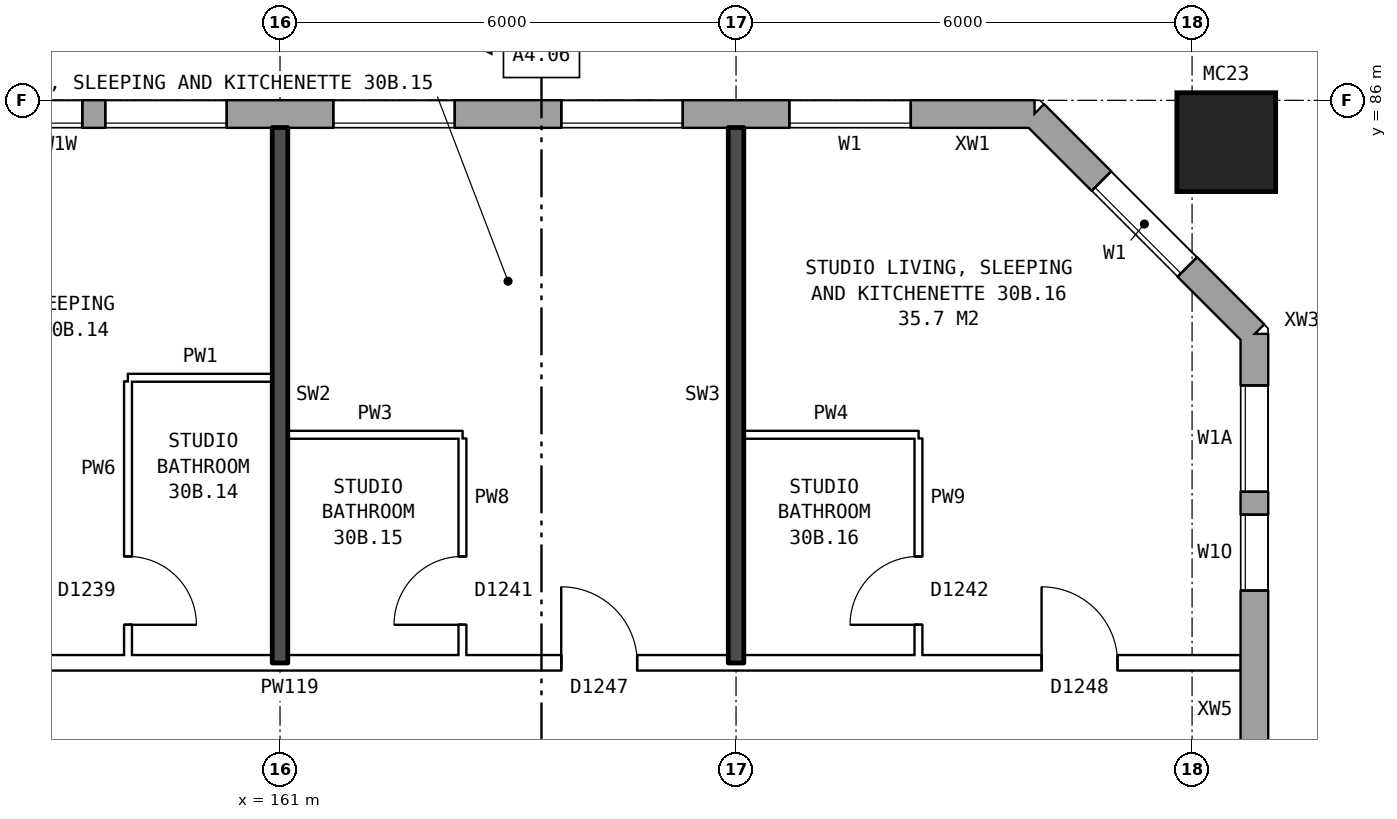
"""IFC4 building model, lengths in metres.
Left out: names, types, materials, properties, quantities, classifications, styles, units other than length and angle.
Written with IfcOpenShell. Run it as: python <this file> out.ifc"""

import sys

from ifc_helpers import new_model, si_unit, direction, frame, frame_2d, origin, origin_2d, place, context, subcontext, project, spatial, rectangle, hollow_rectangle, extrude, element, fill, save


model = new_model("IFC4")
c1 = context("Model", 3, precision=1e-05, world=origin(), true_north=direction((0.0, 1.0)))
c2 = subcontext(c1, "Body", "Model", "MODEL_VIEW")
j1 = project(units=[si_unit("LENGTHUNIT", "METRE"), si_unit("PLANEANGLEUNIT", "RADIAN")], contexts=[c1])
p1 = place(None, origin())
s1 = spatial("IfcSite", under=j1, at=p1, CompositionType="ELEMENT")
p2 = place(p1, origin())
s2 = spatial("IfcBuilding", under=s1, at=p2, CompositionType="ELEMENT")
p3 = place(p2, frame((0.0, 0.0, 108.8)))
s3 = spatial("IfcBuildingStorey", under=s2, at=p3, CompositionType="ELEMENT", Elevation=108.8)
p4 = place(p3, frame((173.45, 85.45, 0.0), z_axis=(0.0, 0.0, 1.0), x_axis=(1.0, 0.0, 0.0)))
e1 = element("IfcColumn", 1, at=p4, inside=s3, PredefinedType="COLUMN", context=c2, shape_type="SweptSolid", body=[
    extrude(hollow_rectangle(XDim=1.3, YDim=1.3, WallThickness=0.07, at=origin_2d()), origin(), (0.0, 0.0, 1.0), 3.1),
])
p5 = place(p3, frame((173.82, 57.075, 0.0), z_axis=(0.0, 0.0, 1.0), x_axis=(0.0, 1.0, 0.0)))
e2 = element("IfcWall", 2, at=p5, inside=s3, PredefinedType="STANDARD", context=c2, shape_type="SweptSolid", body=[
    extrude(rectangle(XDim=25.851, YDim=0.36, at=frame_2d((12.925, 0.0))), origin(), (0.0, 0.0, 1.0), 2.85),
])
p6 = place(p5, frame((0.725, 0.0, 0.8)))
e3 = element("IfcOpeningElement", 3, at=p6, cuts=e2, PredefinedType="OPENING", context=c2, shape_type="SweptSolid", body=[
    extrude(rectangle(XDim=1.6, YDim=1.8, at=frame_2d((0.8, 0.9))), frame((0.0, 0.19, 0.0), z_axis=(0.0, -1.0, 0.0), x_axis=(1.0, 0.0, 0.0)), (0.0, 0.0, 1.0), 0.38),
])
p7 = place(p5, frame((5.525, 0.0, 1.4)))
e4 = element("IfcOpeningElement", 4, at=p7, cuts=e2, PredefinedType="OPENING", context=c2, shape_type="SweptSolid", body=[
    extrude(rectangle(XDim=1.4, YDim=1.2, at=frame_2d((0.7, 0.6))), frame((0.0, 0.19, 0.0), z_axis=(0.0, -1.0, 0.0), x_axis=(1.0, 0.0, 0.0)), (0.0, 0.0, 1.0), 0.38),
])
p8 = place(p5, frame((7.625, 0.0, 0.8)))
e5 = element("IfcOpeningElement", 5, at=p8, cuts=e2, PredefinedType="OPENING", context=c2, shape_type="SweptSolid", body=[
    extrude(rectangle(XDim=1.6, YDim=1.8, at=frame_2d((0.8, 0.9))), frame((0.0, 0.19, 0.0), z_axis=(0.0, -1.0, 0.0), x_axis=(1.0, 0.0, 0.0)), (0.0, 0.0, 1.0), 0.38),
])
p9 = place(p5, frame((10.625, 0.0, 0.8)))
e6 = element("IfcOpeningElement", 6, at=p9, cuts=e2, PredefinedType="OPENING", context=c2, shape_type="SweptSolid", body=[
    extrude(rectangle(XDim=1.6, YDim=1.8, at=frame_2d((0.8, 0.9))), frame((0.0, 0.19, 0.0), z_axis=(0.0, -1.0, 0.0), x_axis=(1.0, 0.0, 0.0)), (0.0, 0.0, 1.0), 0.38),
])
p10 = place(p5, frame((13.625, 0.0, 0.8)))
e7 = element("IfcOpeningElement", 7, at=p10, cuts=e2, PredefinedType="OPENING", context=c2, shape_type="SweptSolid", body=[
    extrude(rectangle(XDim=1.6, YDim=1.8, at=frame_2d((0.8, 0.9))), frame((0.0, 0.19, 0.0), z_axis=(0.0, -1.0, 0.0), x_axis=(1.0, 0.0, 0.0)), (0.0, 0.0, 1.0), 0.38),
])
p11 = place(p5, frame((16.625, 0.0, 0.8)))
e8 = element("IfcOpeningElement", 8, at=p11, cuts=e2, PredefinedType="OPENING", context=c2, shape_type="SweptSolid", body=[
    extrude(rectangle(XDim=1.6, YDim=1.8, at=frame_2d((0.8, 0.9))), frame((0.0, 0.19, 0.0), z_axis=(0.0, -1.0, 0.0), x_axis=(1.0, 0.0, 0.0)), (0.0, 0.0, 1.0), 0.38),
])
p12 = place(p5, frame((9.525, 0.0, 0.8)))
e9 = element("IfcOpeningElement", 9, at=p12, cuts=e2, PredefinedType="OPENING", context=c2, shape_type="SweptSolid", body=[
    extrude(rectangle(XDim=0.8, YDim=1.8, at=frame_2d((0.4, 0.9))), frame((0.0, 0.19, 0.0), z_axis=(0.0, -1.0, 0.0), x_axis=(1.0, 0.0, 0.0)), (0.0, 0.0, 1.0), 0.38),
])
p13 = place(p5, frame((22.475, 0.0, 0.8)))
e10 = element("IfcOpeningElement", 10, at=p13, cuts=e2, PredefinedType="OPENING", context=c2, shape_type="SweptSolid", body=[
    extrude(rectangle(XDim=1.0, YDim=1.2, at=frame_2d((0.5, 0.6))), frame((0.0, 0.19, 0.0), z_axis=(0.0, -1.0, 0.0), x_axis=(1.0, 0.0, 0.0)), (0.0, 0.0, 1.0), 0.38),
])
p14 = place(p5, frame((2.625, 0.0, 0.8)))
e11 = element("IfcOpeningElement", 11, at=p14, cuts=e2, PredefinedType="OPENING", context=c2, shape_type="SweptSolid", body=[
    extrude(rectangle(XDim=0.6, YDim=1.2, at=frame_2d((0.3, 0.6))), frame((0.0, 0.19, 0.0), z_axis=(0.0, -1.0, 0.0), x_axis=(1.0, 0.0, 0.0)), (0.0, 0.0, 1.0), 0.38),
])
p15 = place(p5, frame((12.525, 0.0, 0.8)))
e12 = element("IfcOpeningElement", 12, at=p15, cuts=e2, PredefinedType="OPENING", context=c2, shape_type="SweptSolid", body=[
    extrude(rectangle(XDim=0.8, YDim=1.8, at=frame_2d((0.4, 0.9))), frame((0.0, 0.19, 0.0), z_axis=(0.0, -1.0, 0.0), x_axis=(1.0, 0.0, 0.0)), (0.0, 0.0, 1.0), 0.38),
])
p16 = place(p5, frame((15.525, 0.0, 0.8)))
e13 = element("IfcOpeningElement", 13, at=p16, cuts=e2, PredefinedType="OPENING", context=c2, shape_type="SweptSolid", body=[
    extrude(rectangle(XDim=0.8, YDim=1.8, at=frame_2d((0.4, 0.9))), frame((0.0, 0.19, 0.0), z_axis=(0.0, -1.0, 0.0), x_axis=(1.0, 0.0, 0.0)), (0.0, 0.0, 1.0), 0.38),
])
p17 = place(p5, frame((18.525, 0.0, 0.8)))
e14 = element("IfcOpeningElement", 14, at=p17, cuts=e2, PredefinedType="OPENING", context=c2, shape_type="SweptSolid", body=[
    extrude(rectangle(XDim=0.8, YDim=1.8, at=frame_2d((0.4, 0.9))), frame((0.0, 0.19, 0.0), z_axis=(0.0, -1.0, 0.0), x_axis=(1.0, 0.0, 0.0)), (0.0, 0.0, 1.0), 0.38),
])
p18 = place(p5, frame((23.775, 0.0, 0.8)))
e15 = element("IfcOpeningElement", 15, at=p18, cuts=e2, PredefinedType="OPENING", context=c2, shape_type="SweptSolid", body=[
    extrude(rectangle(XDim=1.4, YDim=1.8, at=frame_2d((0.7, 0.9))), frame((0.0, 0.19, 0.0), z_axis=(0.0, -1.0, 0.0), x_axis=(1.0, 0.0, 0.0)), (0.0, 0.0, 1.0), 0.38),
])
p19 = place(p3, frame((173.82, 82.925, 0.0), z_axis=(0.0, 0.0, 1.0), x_axis=(-0.707106781187, 0.707106781187, 0.0)))
e16 = element("IfcWall", 16, at=p19, inside=s3, PredefinedType="STANDARD", context=c2, shape_type="SweptSolid", body=[
    extrude(rectangle(XDim=4.094, YDim=0.36, at=frame_2d((2.047, 0.0))), origin(), (0.0, 0.0, 1.0), 2.85),
])
p20 = place(p19, frame((1.247, 0.0, 0.8)))
e17 = element("IfcOpeningElement", 17, at=p20, cuts=e16, PredefinedType="OPENING", context=c2, shape_type="SweptSolid", body=[
    extrude(rectangle(XDim=1.6, YDim=1.8, at=frame_2d((0.8, 0.9))), frame((0.0, 0.19, 0.0), z_axis=(0.0, -1.0, 0.0), x_axis=(1.0, 0.0, 0.0)), (0.0, 0.0, 1.0), 0.38),
])
p21 = place(p3, frame((170.925, 85.82, 0.0), z_axis=(0.0, 0.0, 1.0), x_axis=(-1.0, 0.0, 0.0)))
e18 = element("IfcWall", 18, at=p21, inside=s3, PredefinedType="STANDARD", context=c2, shape_type="SweptSolid", body=[
    extrude(rectangle(XDim=36.851, YDim=0.36, at=frame_2d((18.425, 0.0))), origin(), (0.0, 0.0, 1.0), 2.85),
])
p22 = place(p21, frame((1.625, 0.0, 0.8)))
e19 = element("IfcOpeningElement", 19, at=p22, cuts=e18, PredefinedType="OPENING", context=c2, shape_type="SweptSolid", body=[
    extrude(rectangle(XDim=1.6, YDim=1.8, at=frame_2d((0.8, 0.9))), frame((0.0, 0.19, 0.0), z_axis=(0.0, -1.0, 0.0), x_axis=(1.0, 0.0, 0.0)), (0.0, 0.0, 1.0), 0.38),
])
p23 = place(p21, frame((4.625, 0.0, 0.8)))
e20 = element("IfcOpeningElement", 20, at=p23, cuts=e18, PredefinedType="OPENING", context=c2, shape_type="SweptSolid", body=[
    extrude(rectangle(XDim=1.6, YDim=1.8, at=frame_2d((0.8, 0.9))), frame((0.0, 0.19, 0.0), z_axis=(0.0, -1.0, 0.0), x_axis=(1.0, 0.0, 0.0)), (0.0, 0.0, 1.0), 0.38),
])
p24 = place(p21, frame((7.625, 0.0, 0.8)))
e21 = element("IfcOpeningElement", 21, at=p24, cuts=e18, PredefinedType="OPENING", context=c2, shape_type="SweptSolid", body=[
    extrude(rectangle(XDim=1.6, YDim=1.8, at=frame_2d((0.8, 0.9))), frame((0.0, 0.19, 0.0), z_axis=(0.0, -1.0, 0.0), x_axis=(1.0, 0.0, 0.0)), (0.0, 0.0, 1.0), 0.38),
])
p25 = place(p21, frame((10.625, 0.0, 0.8)))
e22 = element("IfcOpeningElement", 22, at=p25, cuts=e18, PredefinedType="OPENING", context=c2, shape_type="SweptSolid", body=[
    extrude(rectangle(XDim=1.6, YDim=1.8, at=frame_2d((0.8, 0.9))), frame((0.0, 0.19, 0.0), z_axis=(0.0, -1.0, 0.0), x_axis=(1.0, 0.0, 0.0)), (0.0, 0.0, 1.0), 0.38),
])
p26 = place(p21, frame((12.525, 0.0, 1.7)))
e23 = element("IfcOpeningElement", 23, at=p26, cuts=e18, PredefinedType="OPENING", context=c2, shape_type="SweptSolid", body=[
    extrude(rectangle(XDim=0.6, YDim=0.9, at=frame_2d((0.3, 0.45))), frame((0.0, 0.19, 0.0), z_axis=(0.0, -1.0, 0.0), x_axis=(1.0, 0.0, 0.0)), (0.0, 0.0, 1.0), 0.38),
])
p27 = place(p21, frame((16.625, 0.0, 0.8)))
e24 = element("IfcOpeningElement", 24, at=p27, cuts=e18, PredefinedType="OPENING", context=c2, shape_type="SweptSolid", body=[
    extrude(rectangle(XDim=1.6, YDim=1.8, at=frame_2d((0.8, 0.9))), frame((0.0, 0.19, 0.0), z_axis=(0.0, -1.0, 0.0), x_axis=(1.0, 0.0, 0.0)), (0.0, 0.0, 1.0), 0.38),
])
p28 = place(p21, frame((19.625, 0.0, 0.8)))
e25 = element("IfcOpeningElement", 25, at=p28, cuts=e18, PredefinedType="OPENING", context=c2, shape_type="SweptSolid", body=[
    extrude(rectangle(XDim=1.6, YDim=1.8, at=frame_2d((0.8, 0.9))), frame((0.0, 0.19, 0.0), z_axis=(0.0, -1.0, 0.0), x_axis=(1.0, 0.0, 0.0)), (0.0, 0.0, 1.0), 0.38),
])
p29 = place(p21, frame((22.125, 0.0, 0.15)))
e26 = element("IfcOpeningElement", 26, at=p29, cuts=e18, PredefinedType="OPENING", context=c2, shape_type="SweptSolid", body=[
    extrude(rectangle(XDim=1.2, YDim=0.9, at=frame_2d((0.6, 0.45))), frame((0.0, 0.19, 0.0), z_axis=(0.0, -1.0, 0.0), x_axis=(1.0, 0.0, 0.0)), (0.0, 0.0, 1.0), 0.38),
])
p30 = place(p21, frame((25.625, 0.0, 0.8)))
e27 = element("IfcOpeningElement", 27, at=p30, cuts=e18, PredefinedType="OPENING", context=c2, shape_type="SweptSolid", body=[
    extrude(rectangle(XDim=1.6, YDim=1.8, at=frame_2d((0.8, 0.9))), frame((0.0, 0.19, 0.0), z_axis=(0.0, -1.0, 0.0), x_axis=(1.0, 0.0, 0.0)), (0.0, 0.0, 1.0), 0.38),
])
p31 = place(p21, frame((28.625, 0.0, 0.8)))
e28 = element("IfcOpeningElement", 28, at=p31, cuts=e18, PredefinedType="OPENING", context=c2, shape_type="SweptSolid", body=[
    extrude(rectangle(XDim=1.6, YDim=1.8, at=frame_2d((0.8, 0.9))), frame((0.0, 0.19, 0.0), z_axis=(0.0, -1.0, 0.0), x_axis=(1.0, 0.0, 0.0)), (0.0, 0.0, 1.0), 0.38),
])
p32 = place(p21, frame((31.625, 0.0, 0.8)))
e29 = element("IfcOpeningElement", 29, at=p32, cuts=e18, PredefinedType="OPENING", context=c2, shape_type="SweptSolid", body=[
    extrude(rectangle(XDim=1.6, YDim=1.8, at=frame_2d((0.8, 0.9))), frame((0.0, 0.19, 0.0), z_axis=(0.0, -1.0, 0.0), x_axis=(1.0, 0.0, 0.0)), (0.0, 0.0, 1.0), 0.38),
])
p33 = place(p21, frame((34.625, 0.0, 0.8)))
e30 = element("IfcOpeningElement", 30, at=p33, cuts=e18, PredefinedType="OPENING", context=c2, shape_type="SweptSolid", body=[
    extrude(rectangle(XDim=1.6, YDim=1.8, at=frame_2d((0.8, 0.9))), frame((0.0, 0.19, 0.0), z_axis=(0.0, -1.0, 0.0), x_axis=(1.0, 0.0, 0.0)), (0.0, 0.0, 1.0), 0.38),
])
p34 = place(p21, frame((14.275, 0.0, 0.8)))
e31 = element("IfcOpeningElement", 31, at=p34, cuts=e18, PredefinedType="OPENING", context=c2, shape_type="SweptSolid", body=[
    extrude(rectangle(XDim=1.4, YDim=0.9, at=frame_2d((0.7, 0.45))), frame((0.0, 0.19, 0.0), z_axis=(0.0, -1.0, 0.0), x_axis=(1.0, 0.0, 0.0)), (0.0, 0.0, 1.0), 0.38),
])
p35 = place(p21, frame((23.775, 0.0, 1.65)))
e32 = element("IfcOpeningElement", 32, at=p35, cuts=e18, PredefinedType="OPENING", context=c2, shape_type="SweptSolid", body=[
    extrude(rectangle(XDim=1.0, YDim=0.9, at=frame_2d((0.5, 0.45))), frame((0.0, 0.19, 0.0), z_axis=(0.0, -1.0, 0.0), x_axis=(1.0, 0.0, 0.0)), (0.0, 0.0, 1.0), 0.38),
])
p36 = place(p3, frame((155.1, 78.6, 0.0), z_axis=(0.0, 0.0, 1.0), x_axis=(1.0, 0.0, 0.0)))
e33 = element("IfcWall", 33, at=p36, inside=s3, PredefinedType="PARTITIONING", context=c2, shape_type="SweptSolid", body=[
    extrude(rectangle(XDim=18.54, YDim=0.2, at=frame_2d((9.27, 0.0))), origin(), (0.0, 0.0, 1.0), 2.85),
])
p37 = place(p36, frame((1.45, 0.0, 0.0)))
e34 = element("IfcOpeningElement", 34, at=p37, cuts=e33, PredefinedType="OPENING", context=c2, shape_type="SweptSolid", body=[
    extrude(rectangle(XDim=1.0, YDim=2.1, at=frame_2d((0.5, 1.05))), frame((0.0, 0.11, 0.0), z_axis=(0.0, -1.0, 0.0), x_axis=(1.0, 0.0, 0.0)), (0.0, 0.0, 1.0), 0.22),
])
p38 = place(p36, frame((9.6, 0.0, 0.0)))
e35 = element("IfcOpeningElement", 35, at=p38, cuts=e33, PredefinedType="OPENING", context=c2, shape_type="SweptSolid", body=[
    extrude(rectangle(XDim=1.0, YDim=2.1, at=frame_2d((0.5, 1.05))), frame((0.0, 0.11, 0.0), z_axis=(0.0, -1.0, 0.0), x_axis=(1.0, 0.0, 0.0)), (0.0, 0.0, 1.0), 0.22),
])
p39 = place(p36, frame((15.92, 0.0, 0.0)))
e36 = element("IfcOpeningElement", 36, at=p39, cuts=e33, PredefinedType="OPENING", context=c2, shape_type="SweptSolid", body=[
    extrude(rectangle(XDim=1.0, YDim=2.1, at=frame_2d((0.5, 1.05))), frame((0.0, 0.11, 0.0), z_axis=(0.0, -1.0, 0.0), x_axis=(1.0, 0.0, 0.0)), (0.0, 0.0, 1.0), 0.22),
])
for number, where, z_axis, x_axis in (
    (37, (161.1, 81.6, 0.0), (0.0, 0.0, 1.0), (1.0, 0.0, 0.0)),
    (38, (167.1, 81.6, 0.0), (0.0, 0.0, 1.0), (1.0, 0.0, 0.0)),
):
    element("IfcWall", number, at=place(p3, frame(where, z_axis=z_axis, x_axis=x_axis)), inside=s3, PredefinedType="PARTITIONING", context=c2, shape_type="SweptSolid", body=[
        extrude(rectangle(XDim=2.3, YDim=0.1, at=frame_2d((1.15, 0.0))), origin(), (0.0, 0.0, 1.0), 2.85),
    ])
p40 = place(p3, frame((159.0, 82.35, 0.0), z_axis=(0.0, 0.0, 1.0), x_axis=(1.0, 0.0, 0.0)))
e39 = element("IfcWall", 39, at=p40, inside=s3, PredefinedType="PARTITIONING", context=c2, shape_type="SweptSolid", body=[
    extrude(rectangle(XDim=1.9, YDim=0.1, at=frame_2d((0.95, 0.0))), origin(), (0.0, 0.0, 1.0), 2.85),
])
p41 = place(p3, frame((159.0, 78.7, 0.0), z_axis=(0.0, 0.0, 1.0), x_axis=(0.0, 1.0, 0.0)))
e40 = element("IfcWall", 40, at=p41, inside=s3, PredefinedType="PARTITIONING", context=c2, shape_type="SweptSolid", body=[
    extrude(rectangle(XDim=3.6, YDim=0.1, at=frame_2d((1.8, 0.0))), origin(), (0.0, 0.0, 1.0), 2.85),
])
p42 = place(p41, frame((0.4, 0.0, 0.0)))
e41 = element("IfcOpeningElement", 41, at=p42, cuts=e40, PredefinedType="OPENING", context=c2, shape_type="SweptSolid", body=[
    extrude(rectangle(XDim=0.9, YDim=2.1, at=frame_2d((0.45, 1.05))), frame((0.0, 0.06, 0.0), z_axis=(0.0, -1.0, 0.0), x_axis=(1.0, 0.0, 0.0)), (0.0, 0.0, 1.0), 0.12),
])
p43 = place(p3, frame((161.0, 78.6, 0.0), z_axis=(0.0, 0.0, 1.0), x_axis=(0.0, 1.0, 0.0)))
e42 = element("IfcWall", 42, at=p43, inside=s3, PredefinedType="SOLIDWALL", context=c2, shape_type="SweptSolid", body=[
    extrude(rectangle(XDim=7.04, YDim=0.2, at=frame_2d((3.52, 0.0))), origin(), (0.0, 0.0, 1.0), 2.85),
])
p44 = place(p3, frame((163.4, 78.7, 0.0), z_axis=(0.0, 0.0, 1.0), x_axis=(0.0, 1.0, 0.0)))
e43 = element("IfcWall", 43, at=p44, inside=s3, PredefinedType="PARTITIONING", context=c2, shape_type="SweptSolid", body=[
    extrude(rectangle(XDim=2.85, YDim=0.1, at=frame_2d((1.425, 0.0))), origin(), (0.0, 0.0, 1.0), 2.85),
])
p45 = place(p44, frame((0.4, 0.0, 0.0)))
e44 = element("IfcOpeningElement", 44, at=p45, cuts=e43, PredefinedType="OPENING", context=c2, shape_type="SweptSolid", body=[
    extrude(rectangle(XDim=0.9, YDim=2.1, at=frame_2d((0.45, 1.05))), frame((0.0, 0.06, 0.0), z_axis=(0.0, -1.0, 0.0), x_axis=(1.0, 0.0, 0.0)), (0.0, 0.0, 1.0), 0.12),
])
p46 = place(p3, frame((167.0, 78.6, 0.0), z_axis=(0.0, 0.0, 1.0), x_axis=(0.0, 1.0, 0.0)))
e45 = element("IfcWall", 45, at=p46, inside=s3, PredefinedType="SOLIDWALL", context=c2, shape_type="SweptSolid", body=[
    extrude(rectangle(XDim=7.04, YDim=0.2, at=frame_2d((3.52, 0.0))), origin(), (0.0, 0.0, 1.0), 2.85),
])
p47 = place(p3, frame((169.4, 78.7, 0.0), z_axis=(0.0, 0.0, 1.0), x_axis=(0.0, 1.0, 0.0)))
e46 = element("IfcWall", 46, at=p47, inside=s3, PredefinedType="PARTITIONING", context=c2, shape_type="SweptSolid", body=[
    extrude(rectangle(XDim=2.85, YDim=0.1, at=frame_2d((1.425, 0.0))), origin(), (0.0, 0.0, 1.0), 2.85),
])
p48 = place(p47, frame((0.4, 0.0, 0.0)))
e47 = element("IfcOpeningElement", 47, at=p48, cuts=e46, PredefinedType="OPENING", context=c2, shape_type="SweptSolid", body=[
    extrude(rectangle(XDim=0.9, YDim=2.1, at=frame_2d((0.45, 1.05))), frame((0.0, 0.06, 0.0), z_axis=(0.0, -1.0, 0.0), x_axis=(1.0, 0.0, 0.0)), (0.0, 0.0, 1.0), 0.12),
])
p49 = place(p13, origin())
e48 = element("IfcWindow", 48, at=p49, inside=s3, PartitioningType="SINGLE_PANEL", PredefinedType="WINDOW", context=c2, shape_type="SweptSolid", body=[
    extrude(rectangle(XDim=1.0, YDim=1.2, at=frame_2d((0.5, 0.6))), frame((0.0, 0.15, 0.0), z_axis=(0.0, -1.0, 0.0), x_axis=(1.0, 0.0, 0.0)), (0.0, 0.0, 1.0), 0.06),
])
fill(e10, e48)
p50 = place(p20, origin())
e49 = element("IfcWindow", 49, at=p50, inside=s3, PartitioningType="SINGLE_PANEL", PredefinedType="WINDOW", context=c2, shape_type="SweptSolid", body=[
    extrude(rectangle(XDim=1.6, YDim=1.8, at=frame_2d((0.8, 0.9))), frame((0.0, 0.15, 0.0), z_axis=(0.0, -1.0, 0.0), x_axis=(1.0, 0.0, 0.0)), (0.0, 0.0, 1.0), 0.06),
])
fill(e17, e49)
p51 = place(p22, origin())
e50 = element("IfcWindow", 50, at=p51, inside=s3, PartitioningType="SINGLE_PANEL", PredefinedType="WINDOW", context=c2, shape_type="SweptSolid", body=[
    extrude(rectangle(XDim=1.6, YDim=1.8, at=frame_2d((0.8, 0.9))), frame((0.0, 0.15, 0.0), z_axis=(0.0, -1.0, 0.0), x_axis=(1.0, 0.0, 0.0)), (0.0, 0.0, 1.0), 0.06),
])
fill(e19, e50)
p52 = place(p23, origin())
e51 = element("IfcWindow", 51, at=p52, inside=s3, PartitioningType="SINGLE_PANEL", PredefinedType="WINDOW", context=c2, shape_type="SweptSolid", body=[
    extrude(rectangle(XDim=1.6, YDim=1.8, at=frame_2d((0.8, 0.9))), frame((0.0, 0.15, 0.0), z_axis=(0.0, -1.0, 0.0), x_axis=(1.0, 0.0, 0.0)), (0.0, 0.0, 1.0), 0.06),
])
fill(e20, e51)
p53 = place(p24, origin())
e52 = element("IfcWindow", 52, at=p53, inside=s3, PartitioningType="SINGLE_PANEL", PredefinedType="WINDOW", context=c2, shape_type="SweptSolid", body=[
    extrude(rectangle(XDim=1.6, YDim=1.8, at=frame_2d((0.8, 0.9))), frame((0.0, 0.15, 0.0), z_axis=(0.0, -1.0, 0.0), x_axis=(1.0, 0.0, 0.0)), (0.0, 0.0, 1.0), 0.06),
])
fill(e21, e52)
p54 = place(p25, origin())
e53 = element("IfcWindow", 53, at=p54, inside=s3, PartitioningType="SINGLE_PANEL", PredefinedType="WINDOW", context=c2, shape_type="SweptSolid", body=[
    extrude(rectangle(XDim=1.6, YDim=1.8, at=frame_2d((0.8, 0.9))), frame((0.0, 0.15, 0.0), z_axis=(0.0, -1.0, 0.0), x_axis=(1.0, 0.0, 0.0)), (0.0, 0.0, 1.0), 0.06),
])
fill(e22, e53)
p55 = place(p26, origin())
e54 = element("IfcWindow", 54, at=p55, inside=s3, PartitioningType="SINGLE_PANEL", PredefinedType="WINDOW", context=c2, shape_type="SweptSolid", body=[
    extrude(rectangle(XDim=0.6, YDim=0.9, at=frame_2d((0.3, 0.45))), frame((0.0, 0.15, 0.0), z_axis=(0.0, -1.0, 0.0), x_axis=(1.0, 0.0, 0.0)), (0.0, 0.0, 1.0), 0.06),
])
fill(e23, e54)
p56 = place(p42, frame((0.9, 0.0, 0.0), z_axis=(0.0, 0.0, 1.0), x_axis=(-1.0, 0.0, 0.0)))
e55 = element("IfcDoor", 55, at=p56, inside=s3, OperationType="SINGLE_SWING_RIGHT", PredefinedType="DOOR", context=c2, shape_type="SweptSolid", body=[
    extrude(rectangle(XDim=0.9, YDim=2.1, at=frame_2d((0.45, 1.05))), frame((0.0, 0.025, 0.0), z_axis=(0.0, -1.0, 0.0), x_axis=(1.0, 0.0, 0.0)), (0.0, 0.0, 1.0), 0.05),
])
fill(e41, e55)
p57 = place(p38, origin())
e56 = element("IfcDoor", 56, at=p57, inside=s3, OperationType="SINGLE_SWING_LEFT", PredefinedType="DOOR", context=c2, shape_type="SweptSolid", body=[
    extrude(rectangle(XDim=1.0, YDim=2.1, at=frame_2d((0.5, 1.05))), frame((0.0, 0.025, 0.0), z_axis=(0.0, -1.0, 0.0), x_axis=(1.0, 0.0, 0.0)), (0.0, 0.0, 1.0), 0.05),
])
fill(e35, e56)
p58 = place(p45, origin())
e57 = element("IfcDoor", 57, at=p58, inside=s3, OperationType="SINGLE_SWING_LEFT", PredefinedType="DOOR", context=c2, shape_type="SweptSolid", body=[
    extrude(rectangle(XDim=0.9, YDim=2.1, at=frame_2d((0.45, 1.05))), frame((0.0, 0.025, 0.0), z_axis=(0.0, -1.0, 0.0), x_axis=(1.0, 0.0, 0.0)), (0.0, 0.0, 1.0), 0.05),
])
fill(e44, e57)
p59 = place(p39, origin())
e58 = element("IfcDoor", 58, at=p59, inside=s3, OperationType="SINGLE_SWING_LEFT", PredefinedType="DOOR", context=c2, shape_type="SweptSolid", body=[
    extrude(rectangle(XDim=1.0, YDim=2.1, at=frame_2d((0.5, 1.05))), frame((0.0, 0.025, 0.0), z_axis=(0.0, -1.0, 0.0), x_axis=(1.0, 0.0, 0.0)), (0.0, 0.0, 1.0), 0.05),
])
fill(e36, e58)
p60 = place(p48, origin())
e59 = element("IfcDoor", 59, at=p60, inside=s3, OperationType="SINGLE_SWING_LEFT", PredefinedType="DOOR", context=c2, shape_type="SweptSolid", body=[
    extrude(rectangle(XDim=0.9, YDim=2.1, at=frame_2d((0.45, 1.05))), frame((0.0, 0.025, 0.0), z_axis=(0.0, -1.0, 0.0), x_axis=(1.0, 0.0, 0.0)), (0.0, 0.0, 1.0), 0.05),
])
fill(e47, e59)
p61 = place(p18, origin())
e60 = element("IfcWindow", 60, at=p61, inside=s3, PartitioningType="SINGLE_PANEL", PredefinedType="WINDOW", context=c2, shape_type="SweptSolid", body=[
    extrude(rectangle(XDim=1.4, YDim=1.8, at=frame_2d((0.7, 0.9))), frame((0.0, 0.15, 0.0), z_axis=(0.0, -1.0, 0.0), x_axis=(1.0, 0.0, 0.0)), (0.0, 0.0, 1.0), 0.06),
])
fill(e15, e60)
save(model, sys.argv[1])
